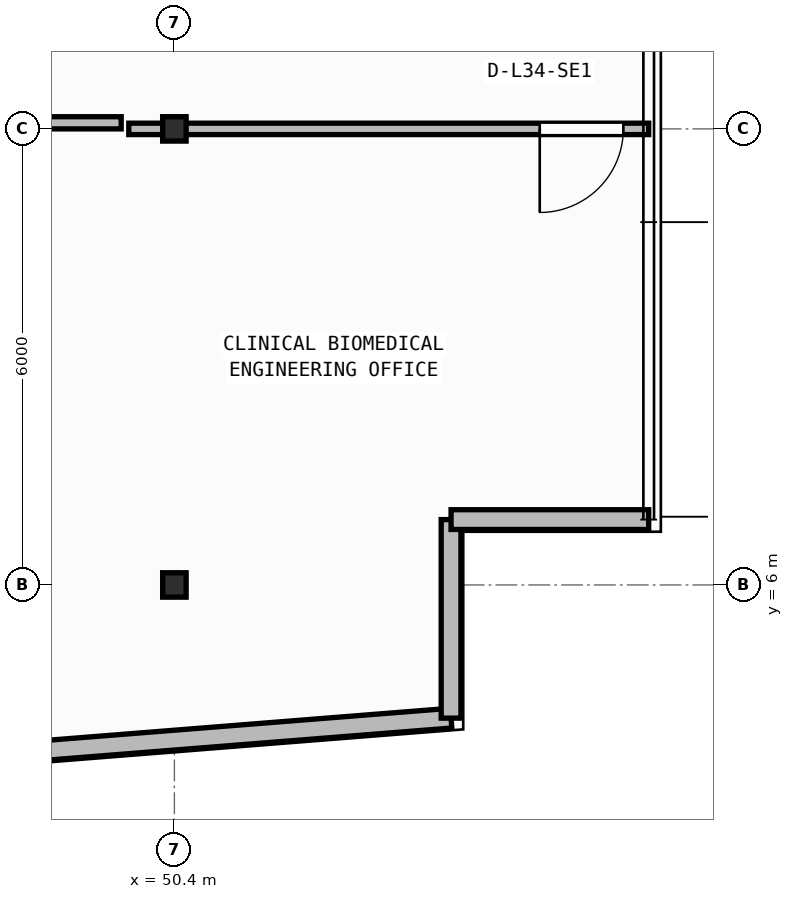
"""IFC4 building model, lengths in metres.
Left out: names, types, materials, properties, quantities, classifications, styles, units other than length and angle.
Written with IfcOpenShell. Run it as: python <this file> out.ifc"""

import sys

from ifc_helpers import new_model, si_unit, direction, frame, frame_2d, origin, origin_2d, place, context, subcontext, project, spatial, rectangle, i_section, extrude, element, fill, save


model = new_model("IFC4")
c1 = context("Model", 3, precision=1e-05, world=origin(), true_north=direction((0.0, 1.0)))
c2 = subcontext(c1, "Body", "Model", "MODEL_VIEW")
j1 = project(units=[si_unit("LENGTHUNIT", "METRE"), si_unit("PLANEANGLEUNIT", "RADIAN")], contexts=[c1])
p1 = place(None, origin())
s1 = spatial("IfcSite", under=j1, at=p1, CompositionType="ELEMENT")
p2 = place(p1, origin())
s2 = spatial("IfcBuilding", under=s1, at=p2, CompositionType="ELEMENT")
p3 = place(p2, frame((0.0, 0.0, 138.9)))
s3 = spatial("IfcBuildingStorey", under=s2, at=p3, CompositionType="ELEMENT", Elevation=138.9)
for number, where, z_axis, x_axis in (
    (1, (50.4, 6.0, 0.0), (0.0, 0.0, 1.0), (1.0, 0.0, 0.0)),
    (2, (50.4, 12.0, 0.0), (0.0, 0.0, 1.0), (1.0, 0.0, 0.0)),
):
    element("IfcColumn", number, at=place(p3, frame(where, z_axis=z_axis, x_axis=x_axis)), inside=s3, PredefinedType="COLUMN", context=c2, shape_type="SweptSolid", body=[
        extrude(i_section(OverallWidth=0.309, OverallDepth=0.321, WebThickness=0.014, FlangeThickness=0.022, FilletRadius=0.017, at=origin_2d()), origin(), (0.0, 0.0, 1.0), 3.95),
    ])
p4 = place(p3, frame((2.76, 0.173, 0.0), z_axis=(0.0, 0.0, 1.0), x_axis=(0.996857931723, 0.079210251617, 0.0)))
e3 = element("IfcWall", 3, at=p4, inside=s3, PredefinedType="STANDARD", context=c2, shape_type="SweptSolid", body=[
    extrude(rectangle(XDim=51.442, YDim=0.26, at=frame_2d((25.721, 0.0))), origin(), (0.0, 0.0, 1.0), 3.71),
])
p5 = place(p4, frame((24.521, 0.0, 0.9)))
e4 = element("IfcOpeningElement", 4, at=p5, cuts=e3, PredefinedType="OPENING", context=c2, shape_type="SweptSolid", body=[
    extrude(rectangle(XDim=2.4, YDim=1.65, at=frame_2d((1.2, 0.825))), frame((0.0, 0.14, 0.0), z_axis=(0.0, -1.0, 0.0), x_axis=(1.0, 0.0, 0.0)), (0.0, 0.0, 1.0), 0.28),
])
p6 = place(p3, frame((54.04, 4.248, 0.0), z_axis=(0.0, 0.0, 1.0), x_axis=(0.0, 1.0, 0.0)))
e5 = element("IfcWall", 5, at=p6, inside=s3, PredefinedType="STANDARD", context=c2, shape_type="SweptSolid", body=[
    extrude(rectangle(XDim=2.612, YDim=0.26, at=frame_2d((1.306, 0.0))), origin(), (0.0, 0.0, 1.0), 3.71),
])
p7 = place(p3, frame((54.04, 6.86, 0.0), z_axis=(0.0, 0.0, 1.0), x_axis=(1.0, 0.0, 0.0)))
e6 = element("IfcWall", 6, at=p7, inside=s3, PredefinedType="STANDARD", context=c2, shape_type="SweptSolid", body=[
    extrude(rectangle(XDim=2.6, YDim=0.26, at=frame_2d((1.3, 0.0))), origin(), (0.0, 0.0, 1.0), 3.71),
])
p8 = place(p3, frame((56.64, 12.0, 0.0), z_axis=(0.0, 0.0, 1.0), x_axis=(-1.0, 0.0, 0.0)))
e7 = element("IfcWall", 7, at=p8, inside=s3, PredefinedType="PARTITIONING", context=c2, shape_type="SweptSolid", body=[
    extrude(rectangle(XDim=6.84, YDim=0.15, at=frame_2d((3.42, 0.0))), origin(), (0.0, 0.0, 1.0), 3.083),
])
p9 = place(p8, frame((0.333, 0.0, 0.0)))
e8 = element("IfcOpeningElement", 8, at=p9, cuts=e7, PredefinedType="OPENING", context=c2, shape_type="SweptSolid", body=[
    extrude(rectangle(XDim=1.1, YDim=2.1, at=frame_2d((0.55, 1.05))), frame((0.0, 0.085, 0.0), z_axis=(0.0, -1.0, 0.0), x_axis=(1.0, 0.0, 0.0)), (0.0, 0.0, 1.0), 0.17),
])
p10 = place(p3, frame((46.689, 12.08, 0.0), z_axis=(0.0, 0.0, 1.0), x_axis=(1.0, 0.0, 0.0)))
e9 = element("IfcWall", 9, at=p10, inside=s3, PredefinedType="PARTITIONING", context=c2, shape_type="SweptSolid", body=[
    extrude(rectangle(XDim=3.011, YDim=0.16, at=frame_2d((1.505, 0.0))), origin(), (0.0, 0.0, 1.0), 3.083),
])
p11 = place(p9, origin())
e10 = element("IfcDoor", 10, at=p11, inside=s3, OperationType="SINGLE_SWING_RIGHT", PredefinedType="DOOR", context=c2, shape_type="SweptSolid", body=[
    extrude(rectangle(XDim=1.1, YDim=2.1, at=frame_2d((0.55, 1.05))), frame((0.0, 0.025, 0.0), z_axis=(0.0, -1.0, 0.0), x_axis=(1.0, 0.0, 0.0)), (0.0, 0.0, 1.0), 0.05),
])
fill(e8, e10)
save(model, sys.argv[1])
